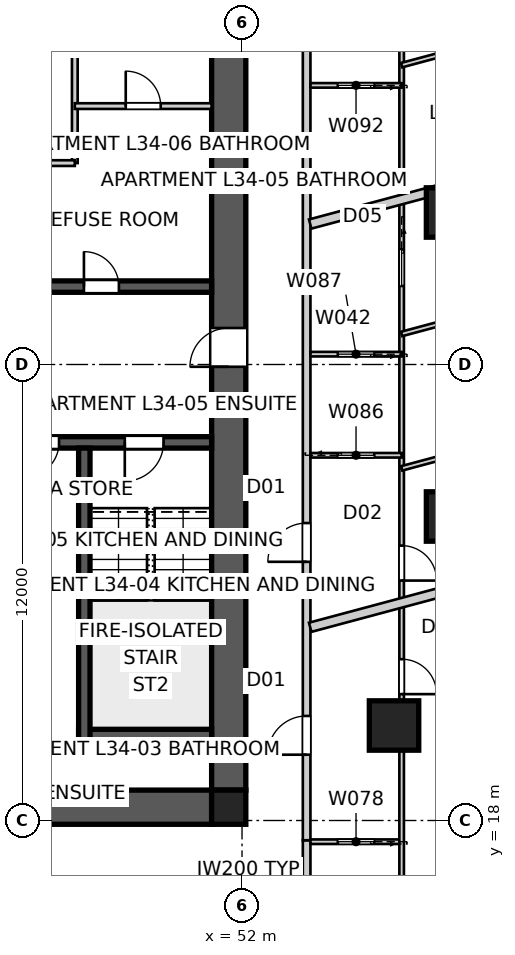
"""IFC4 building model, lengths in metres.
Left out: names, types, materials, properties, quantities, classifications, styles, units other than length and angle.
Written with IfcOpenShell. Run it as: python <this file> out.ifc"""

import sys

from ifc_helpers import new_model, si_unit, direction, frame, frame_2d, origin, origin_2d, place, context, subcontext, project, spatial, polyline, rectangle, outline, extrude, element, fill, save


model = new_model("IFC4")
c1 = context("Model", 3, precision=1e-05, world=origin(), true_north=direction((0.0, 1.0)))
c2 = subcontext(c1, "Body", "Model", "MODEL_VIEW")
j1 = project(units=[si_unit("LENGTHUNIT", "METRE"), si_unit("PLANEANGLEUNIT", "RADIAN")], contexts=[c1])
p1 = place(None, origin())
s1 = spatial("IfcSite", under=j1, at=p1, CompositionType="ELEMENT")
p2 = place(p1, origin())
s2 = spatial("IfcBuilding", under=s1, at=p2, CompositionType="ELEMENT")
p3 = place(p2, frame((0.0, 0.0, 125.2)))
s3 = spatial("IfcBuildingStorey", under=s2, at=p3, CompositionType="ELEMENT", Elevation=125.2)
p4 = place(p3, frame((51.2, 18.35, 0.0), z_axis=(0.0, 0.0, 1.0), x_axis=(-1.0, 0.0, 0.0)))
e1 = element("IfcWall", 1, at=p4, inside=s3, PredefinedType="SHEAR", context=c2, shape_type="SweptSolid", body=[
    extrude(outline(polyline([(0.0, -0.45), (22.4, -0.45), (22.4, -0.025), (22.85, -0.025), (22.85, 0.025), (22.4, 0.025), (22.4, 0.45), (0.0, 0.45), (0.0, 0.025), (-0.45, 0.025), (-0.45, -0.025), (0.0, -0.025), (0.0, -0.45)])), origin(), (0.0, 0.0, 1.0), 3.4),
])
p5 = place(p3, frame((51.65, 18.8, 0.0), z_axis=(0.0, 0.0, 1.0), x_axis=(0.0, 1.0, 0.0)))
e2 = element("IfcWall", 2, at=p5, inside=s3, PredefinedType="SHEAR", context=c2, shape_type="SweptSolid", body=[
    extrude(outline(polyline([(0.0, -0.45), (22.4, -0.45), (22.4, -0.025), (22.85, -0.025), (22.85, 0.025), (22.4, 0.025), (22.4, 0.45), (0.0, 0.45), (0.0, 0.025), (-0.45, 0.025), (-0.45, -0.025), (0.0, -0.025), (0.0, -0.45)])), origin(), (0.0, 0.0, 1.0), 3.4),
])
p6 = place(p5, frame((11.14, 0.0, 0.0)))
e3 = element("IfcOpeningElement", 3, at=p6, cuts=e2, PredefinedType="OPENING", context=c2, shape_type="SweptSolid", body=[
    extrude(rectangle(XDim=1.02, YDim=2.4, at=frame_2d((0.51, 1.2))), frame((0.0, 0.46, 0.0), z_axis=(0.0, -1.0, 0.0), x_axis=(1.0, 0.0, 0.0)), (0.0, 0.0, 1.0), 0.92),
])
p7 = place(p3, frame((28.8, 32.05, 0.0), z_axis=(0.0, 0.0, 1.0), x_axis=(1.0, 0.0, 0.0)))
e4 = element("IfcWall", 4, at=p7, inside=s3, PredefinedType="SHEAR", context=c2, shape_type="SweptSolid", body=[
    extrude(rectangle(XDim=22.4, YDim=0.3, at=frame_2d((11.2, 0.0))), origin(), (0.0, 0.0, 1.0), 3.4),
])
p8 = place(p7, frame((19.04, 0.0, 0.0)))
e5 = element("IfcOpeningElement", 5, at=p8, cuts=e4, PredefinedType="OPENING", context=c2, shape_type="SweptSolid", body=[
    extrude(rectangle(XDim=0.92, YDim=2.1, at=frame_2d((0.46, 1.05))), frame((0.0, 0.16, 0.0), z_axis=(0.0, -1.0, 0.0), x_axis=(1.0, 0.0, 0.0)), (0.0, 0.0, 1.0), 0.32),
])
p9 = place(p7, frame((1.265, 0.0, 0.0)))
e6 = element("IfcOpeningElement", 6, at=p9, cuts=e4, PredefinedType="OPENING", context=c2, shape_type="SweptSolid", body=[
    extrude(rectangle(XDim=1.02, YDim=2.1, at=frame_2d((0.51, 1.05))), frame((0.0, 0.16, 0.0), z_axis=(0.0, -1.0, 0.0), x_axis=(1.0, 0.0, 0.0)), (0.0, 0.0, 1.0), 0.32),
])
p10 = place(p7, frame((4.015, 0.0, 0.0)))
e7 = element("IfcOpeningElement", 7, at=p10, cuts=e4, PredefinedType="OPENING", context=c2, shape_type="SweptSolid", body=[
    extrude(rectangle(XDim=0.92, YDim=2.1, at=frame_2d((0.46, 1.05))), frame((0.0, 0.16, 0.0), z_axis=(0.0, -1.0, 0.0), x_axis=(1.0, 0.0, 0.0)), (0.0, 0.0, 1.0), 0.32),
])
p11 = place(p7, frame((6.45, 0.0, 0.0)))
e8 = element("IfcOpeningElement", 8, at=p11, cuts=e4, PredefinedType="OPENING", context=c2, shape_type="SweptSolid", body=[
    extrude(rectangle(XDim=1.1, YDim=2.1, at=frame_2d((0.55, 1.05))), frame((0.0, 0.16, 0.0), z_axis=(0.0, -1.0, 0.0), x_axis=(1.0, 0.0, 0.0)), (0.0, 0.0, 1.0), 0.32),
])
p12 = place(p7, frame((9.25, 0.0, 0.0)))
e9 = element("IfcOpeningElement", 9, at=p12, cuts=e4, PredefinedType="OPENING", context=c2, shape_type="SweptSolid", body=[
    extrude(rectangle(XDim=1.1, YDim=2.1, at=frame_2d((0.55, 1.05))), frame((0.0, 0.16, 0.0), z_axis=(0.0, -1.0, 0.0), x_axis=(1.0, 0.0, 0.0)), (0.0, 0.0, 1.0), 0.32),
])
p13 = place(p7, frame((14.85, 0.0, 0.0)))
e10 = element("IfcOpeningElement", 10, at=p13, cuts=e4, PredefinedType="OPENING", context=c2, shape_type="SweptSolid", body=[
    extrude(rectangle(XDim=1.1, YDim=2.1, at=frame_2d((0.55, 1.05))), frame((0.0, 0.16, 0.0), z_axis=(0.0, -1.0, 0.0), x_axis=(1.0, 0.0, 0.0)), (0.0, 0.0, 1.0), 0.32),
])
p14 = place(p3, frame((51.2, 27.95, 0.0), z_axis=(0.0, 0.0, 1.0), x_axis=(-1.0, 0.0, 0.0)))
e11 = element("IfcWall", 11, at=p14, inside=s3, PredefinedType="SHEAR", context=c2, shape_type="SweptSolid", body=[
    extrude(rectangle(XDim=22.4, YDim=0.3, at=frame_2d((11.2, 0.0))), origin(), (0.0, 0.0, 1.0), 3.4),
])
p15 = place(p14, frame((19.04, 0.0, 0.0)))
e12 = element("IfcOpeningElement", 12, at=p15, cuts=e11, PredefinedType="OPENING", context=c2, shape_type="SweptSolid", body=[
    extrude(rectangle(XDim=0.92, YDim=2.1, at=frame_2d((0.46, 1.05))), frame((0.0, 0.16, 0.0), z_axis=(0.0, -1.0, 0.0), x_axis=(1.0, 0.0, 0.0)), (0.0, 0.0, 1.0), 0.32),
])
p16 = place(p14, frame((1.265, 0.0, 0.0)))
e13 = element("IfcOpeningElement", 13, at=p16, cuts=e11, PredefinedType="OPENING", context=c2, shape_type="SweptSolid", body=[
    extrude(rectangle(XDim=1.02, YDim=2.1, at=frame_2d((0.51, 1.05))), frame((0.0, 0.16, 0.0), z_axis=(0.0, -1.0, 0.0), x_axis=(1.0, 0.0, 0.0)), (0.0, 0.0, 1.0), 0.32),
])
p17 = place(p14, frame((4.015, 0.0, 0.0)))
e14 = element("IfcOpeningElement", 14, at=p17, cuts=e11, PredefinedType="OPENING", context=c2, shape_type="SweptSolid", body=[
    extrude(rectangle(XDim=0.92, YDim=2.1, at=frame_2d((0.46, 1.05))), frame((0.0, 0.16, 0.0), z_axis=(0.0, -1.0, 0.0), x_axis=(1.0, 0.0, 0.0)), (0.0, 0.0, 1.0), 0.32),
])
p18 = place(p14, frame((14.85, 0.0, 0.0)))
e15 = element("IfcOpeningElement", 15, at=p18, cuts=e11, PredefinedType="OPENING", context=c2, shape_type="SweptSolid", body=[
    extrude(rectangle(XDim=1.1, YDim=2.1, at=frame_2d((0.55, 1.05))), frame((0.0, 0.16, 0.0), z_axis=(0.0, -1.0, 0.0), x_axis=(1.0, 0.0, 0.0)), (0.0, 0.0, 1.0), 0.32),
])
p19 = place(p3, frame((47.85, 27.8, 0.0), z_axis=(0.0, 0.0, 1.0), x_axis=(0.0, -1.0, 0.0)))
e16 = element("IfcWall", 16, at=p19, inside=s3, PredefinedType="SHEAR", context=c2, shape_type="SweptSolid", body=[
    extrude(rectangle(XDim=7.7, YDim=0.3, at=frame_2d((3.85, 0.0))), origin(), (0.0, 0.0, 1.0), 3.4),
])
p20 = place(p3, frame((51.2, 20.25, 0.0), z_axis=(0.0, 0.0, 1.0), x_axis=(-1.0, 0.0, 0.0)))
e17 = element("IfcWall", 17, at=p20, inside=s3, PredefinedType="SHEAR", context=c2, shape_type="SweptSolid", body=[
    extrude(rectangle(XDim=3.5, YDim=0.3, at=frame_2d((1.75, 0.0))), origin(), (0.0, 0.0, 1.0), 3.4),
])
p21 = place(p3, frame((51.65, 18.35, 0.0), z_axis=(0.0, 0.0, 1.0), x_axis=(1.0, 0.0, 0.0)))
e18 = element("IfcColumn", 18, at=p21, inside=s3, PredefinedType="COLUMN", context=c2, shape_type="SweptSolid", body=[
    extrude(rectangle(XDim=0.9, YDim=0.9, at=origin_2d()), origin(), (0.0, 0.0, 1.0), 3.4),
])
for number, where, z_axis, x_axis in (
    (19, (57.5, 26.0, 0.0), (0.0, 0.0, 1.0), (1.0, 0.0, 0.0)),
    (20, (57.5, 34.0, 0.0), (0.0, 0.0, 1.0), (1.0, 0.0, 0.0)),
    (21, (56.0, 20.5, 0.0), (0.0, 0.0, 1.0), (1.0, 0.0, 0.0)),
):
    element("IfcColumn", number, at=place(p3, frame(where, z_axis=z_axis, x_axis=x_axis)), inside=s3, PredefinedType="COLUMN", context=c2, shape_type="SweptSolid", body=[
        extrude(rectangle(XDim=1.3, YDim=1.3, at=origin_2d()), origin(), (0.0, 0.0, 1.0), 3.4),
    ])
p22 = place(p3, frame((53.7, 15.926, 0.0), z_axis=(0.0, 0.0, 1.0), x_axis=(0.0, 1.0, 0.0)))
e22 = element("IfcWall", 22, at=p22, inside=s3, PredefinedType="PARTITIONING", context=c2, shape_type="SweptSolid", body=[
    extrude(rectangle(XDim=1.554, YDim=0.2, at=frame_2d((0.777, 0.0))), origin(), (0.0, 0.0, 1.0), 2.722),
])
p23 = place(p3, frame((53.7, 17.48, 0.0), z_axis=(0.0, 0.0, 1.0), x_axis=(0.0, 1.0, 0.0)))
e23 = element("IfcWall", 23, at=p23, inside=s3, PredefinedType="PARTITIONING", context=c2, shape_type="SweptSolid", body=[
    extrude(rectangle(XDim=26.22, YDim=0.2, at=frame_2d((13.11, 0.0))), origin(), (0.0, 0.0, 1.0), 3.25),
])
p24 = place(p23, frame((2.252, 0.0, 0.0)))
e24 = element("IfcOpeningElement", 24, at=p24, cuts=e23, PredefinedType="OPENING", context=c2, shape_type="SweptSolid", body=[
    extrude(rectangle(XDim=1.02, YDim=2.34, at=frame_2d((0.51, 1.17))), frame((0.0, 0.11, 0.0), z_axis=(0.0, -1.0, 0.0), x_axis=(1.0, 0.0, 0.0)), (0.0, 0.0, 1.0), 0.22),
])
p25 = place(p23, frame((7.328, 0.0, 0.0)))
e25 = element("IfcOpeningElement", 25, at=p25, cuts=e23, PredefinedType="OPENING", context=c2, shape_type="SweptSolid", body=[
    extrude(rectangle(XDim=1.02, YDim=2.34, at=frame_2d((0.51, 1.17))), frame((0.0, 0.11, 0.0), z_axis=(0.0, -1.0, 0.0), x_axis=(1.0, 0.0, 0.0)), (0.0, 0.0, 1.0), 0.22),
])
p26 = place(p3, frame((63.665, 36.341, 0.0), z_axis=(0.0, 0.0, 1.0), x_axis=(-0.965927365002, -0.258813302479, 0.0)))
e26 = element("IfcWall", 26, at=p26, inside=s3, PredefinedType="PARTITIONING", context=c2, shape_type="SweptSolid", body=[
    extrude(rectangle(XDim=10.22, YDim=0.25, at=frame_2d((5.11, 0.0))), origin(), (0.0, 0.0, 1.0), 3.25),
])
p27 = place(p3, frame((66.318, 26.44, 0.0), z_axis=(0.0, 0.0, 1.0), x_axis=(-0.965924854576, -0.258822671559, 0.0)))
e27 = element("IfcWall", 27, at=p27, inside=s3, PredefinedType="PARTITIONING", context=c2, shape_type="SweptSolid", body=[
    extrude(rectangle(XDim=12.966, YDim=0.25, at=frame_2d((6.483, 0.0))), origin(), (0.0, 0.0, 1.0), 3.25),
])
p28 = place(p3, frame((47.6, 41.2, 0.0), z_axis=(0.0, 0.0, 1.0), x_axis=(0.0, -1.0, 0.0)))
e28 = element("IfcWall", 28, at=p28, inside=s3, PredefinedType="SOLIDWALL", context=c2, shape_type="SweptSolid", body=[
    extrude(rectangle(XDim=5.9, YDim=0.15, at=frame_2d((2.95, 0.0))), origin(), (0.0, 0.0, 1.0), 3.25),
])
p29 = place(p3, frame((47.6, 35.3, 0.0), z_axis=(0.0, 0.0, 1.0), x_axis=(-1.0, 0.0, 0.0)))
e29 = element("IfcWall", 29, at=p29, inside=s3, PredefinedType="SOLIDWALL", context=c2, shape_type="SweptSolid", body=[
    extrude(rectangle(XDim=1.85, YDim=0.15, at=frame_2d((0.925, 0.0))), origin(), (0.0, 0.0, 1.0), 3.25),
])
p30 = place(p3, frame((47.6, 36.8, 0.0), z_axis=(0.0, 0.0, 1.0), x_axis=(1.0, 0.0, 0.0)))
e30 = element("IfcWall", 30, at=p30, inside=s3, PredefinedType="SOLIDWALL", context=c2, shape_type="SweptSolid", body=[
    extrude(rectangle(XDim=3.6, YDim=0.15, at=frame_2d((1.8, 0.0))), origin(), (0.0, 0.0, 1.0), 3.25),
])
p31 = place(p30, frame((1.34, 0.0, 0.0)))
e31 = element("IfcOpeningElement", 31, at=p31, cuts=e30, PredefinedType="OPENING", context=c2, shape_type="SweptSolid", body=[
    extrude(rectangle(XDim=0.92, YDim=2.1, at=frame_2d((0.46, 1.05))), frame((0.0, 0.085, 0.0), z_axis=(0.0, -1.0, 0.0), x_axis=(1.0, 0.0, 0.0)), (0.0, 0.0, 1.0), 0.17),
])
p32 = place(p3, frame((56.2, 17.442, 0.0), z_axis=(0.0, 0.0, 1.0), x_axis=(-1.0, 0.0, 0.0)))
e32 = element("IfcWall", 32, at=p32, inside=s3, PredefinedType="PARTITIONING", context=c2, shape_type="SweptSolid", body=[
    extrude(rectangle(XDim=2.4, YDim=0.12, at=frame_2d((1.2, 0.0))), origin(), (0.0, 0.0, 1.0), 3.25),
])
p33 = place(p32, frame((0.72, 0.0, 0.0)))
e33 = element("IfcOpeningElement", 33, at=p33, cuts=e32, PredefinedType="OPENING", context=c2, shape_type="SweptSolid", body=[
    extrude(rectangle(XDim=0.96, YDim=2.1, at=frame_2d((0.48, 1.05))), frame((0.0, 0.07, 0.0), z_axis=(0.0, -1.0, 0.0), x_axis=(1.0, 0.0, 0.0)), (0.0, 0.0, 1.0), 0.14),
])
p34 = place(p3, frame((56.2, 46.2, 0.0), z_axis=(0.0, 0.0, 1.0), x_axis=(0.0, -1.0, 0.0)))
e34 = element("IfcWall", 34, at=p34, inside=s3, PredefinedType="PARTITIONING", context=c2, shape_type="SweptSolid", body=[
    extrude(rectangle(XDim=33.2, YDim=0.12, at=frame_2d((16.6, 0.0))), origin(), (0.0, 0.0, 1.0), 2.55),
])
p35 = place(p34, frame((23.955, 0.0, 0.0)))
e35 = element("IfcOpeningElement", 35, at=p35, cuts=e34, PredefinedType="OPENING", context=c2, shape_type="SweptSolid", body=[
    extrude(rectangle(XDim=0.92, YDim=2.34, at=frame_2d((0.46, 1.17))), frame((0.0, 0.07, 0.0), z_axis=(0.0, -1.0, 0.0), x_axis=(1.0, 0.0, 0.0)), (0.0, 0.0, 1.0), 0.14),
])
p36 = place(p34, frame((20.966, 0.0, 0.0)))
e36 = element("IfcOpeningElement", 36, at=p36, cuts=e34, PredefinedType="OPENING", context=c2, shape_type="SweptSolid", body=[
    extrude(rectangle(XDim=0.92, YDim=2.34, at=frame_2d((0.46, 1.17))), frame((0.0, 0.07, 0.0), z_axis=(0.0, -1.0, 0.0), x_axis=(1.0, 0.0, 0.0)), (0.0, 0.0, 1.0), 0.14),
])
p37 = place(p34, frame((13.174, 0.0, 0.0)))
e37 = element("IfcOpeningElement", 37, at=p37, cuts=e34, PredefinedType="OPENING", context=c2, shape_type="SweptSolid", body=[
    extrude(rectangle(XDim=0.96, YDim=2.1, at=frame_2d((0.48, 1.05))), frame((0.0, 0.07, 0.0), z_axis=(0.0, -1.0, 0.0), x_axis=(1.0, 0.0, 0.0)), (0.0, 0.0, 1.0), 0.14),
])
p38 = place(p3, frame((53.8, 27.611, 0.0), z_axis=(0.0, 0.0, 1.0), x_axis=(1.0, 0.0, 0.0)))
e38 = element("IfcWall", 38, at=p38, inside=s3, PredefinedType="PARTITIONING", context=c2, shape_type="SweptSolid", body=[
    extrude(rectangle(XDim=2.4, YDim=0.12, at=frame_2d((1.2, 0.0))), origin(), (0.0, 0.0, 1.0), 3.25),
])
p39 = place(p38, frame((0.72, 0.0, 0.0)))
e39 = element("IfcOpeningElement", 39, at=p39, cuts=e38, PredefinedType="OPENING", context=c2, shape_type="SweptSolid", body=[
    extrude(rectangle(XDim=0.96, YDim=2.1, at=frame_2d((0.48, 1.05))), frame((0.0, 0.07, 0.0), z_axis=(0.0, -1.0, 0.0), x_axis=(1.0, 0.0, 0.0)), (0.0, 0.0, 1.0), 0.14),
])
p40 = place(p3, frame((56.2, 30.272, 0.0), z_axis=(0.0, 0.0, 1.0), x_axis=(-1.0, 0.0, 0.0)))
e40 = element("IfcWall", 40, at=p40, inside=s3, PredefinedType="PARTITIONING", context=c2, shape_type="SweptSolid", body=[
    extrude(rectangle(XDim=2.4, YDim=0.12, at=frame_2d((1.2, 0.0))), origin(), (0.0, 0.0, 1.0), 3.25),
])
p41 = place(p40, frame((0.72, 0.0, 0.0)))
e41 = element("IfcOpeningElement", 41, at=p41, cuts=e40, PredefinedType="OPENING", context=c2, shape_type="SweptSolid", body=[
    extrude(rectangle(XDim=0.96, YDim=2.1, at=frame_2d((0.48, 1.05))), frame((0.0, 0.07, 0.0), z_axis=(0.0, -1.0, 0.0), x_axis=(1.0, 0.0, 0.0)), (0.0, 0.0, 1.0), 0.14),
])
p42 = place(p3, frame((56.2, 27.266, 0.0), z_axis=(0.0, 0.0, 1.0), x_axis=(0.965926072385, 0.25881812666, 0.0)))
e42 = element("IfcWall", 42, at=p42, inside=s3, PredefinedType="PARTITIONING", context=c2, shape_type="SweptSolid", body=[
    extrude(rectangle(XDim=9.52, YDim=0.12, at=frame_2d((4.76, 0.0))), origin(), (0.0, 0.0, 1.0), 3.25),
])
p43 = place(p42, frame((4.32, 0.0, 0.0)))
e43 = element("IfcOpeningElement", 43, at=p43, cuts=e42, PredefinedType="OPENING", context=c2, shape_type="SweptSolid", body=[
    extrude(rectangle(XDim=0.92, YDim=2.34, at=frame_2d((0.46, 1.17))), frame((0.0, 0.07, 0.0), z_axis=(0.0, -1.0, 0.0), x_axis=(1.0, 0.0, 0.0)), (0.0, 0.0, 1.0), 0.14),
])
p44 = place(p3, frame((56.2, 30.803, 0.0), z_axis=(0.0, 0.0, 1.0), x_axis=(0.965920565748, 0.258838676912, 0.0)))
e44 = element("IfcWall", 44, at=p44, inside=s3, PredefinedType="PARTITIONING", context=c2, shape_type="SweptSolid", body=[
    extrude(rectangle(XDim=8.604, YDim=0.12, at=frame_2d((4.302, 0.0))), origin(), (0.0, 0.0, 1.0), 3.25),
])
p45 = place(p3, frame((56.2, 37.345, 0.0), z_axis=(0.0, 0.0, 1.0), x_axis=(-1.0, 0.0, 0.0)))
e45 = element("IfcWall", 45, at=p45, inside=s3, PredefinedType="PARTITIONING", context=c2, shape_type="SweptSolid", body=[
    extrude(rectangle(XDim=2.4, YDim=0.12, at=frame_2d((1.2, 0.0))), origin(), (0.0, 0.0, 1.0), 3.25),
])
p46 = place(p45, frame((0.72, 0.0, 0.0)))
e46 = element("IfcOpeningElement", 46, at=p46, cuts=e45, PredefinedType="OPENING", context=c2, shape_type="SweptSolid", body=[
    extrude(rectangle(XDim=0.96, YDim=2.1, at=frame_2d((0.48, 1.05))), frame((0.0, 0.07, 0.0), z_axis=(0.0, -1.0, 0.0), x_axis=(1.0, 0.0, 0.0)), (0.0, 0.0, 1.0), 0.14),
])
p47 = place(p3, frame((56.2, 37.878, 0.0), z_axis=(0.0, 0.0, 1.0), x_axis=(0.96591892777, 0.258844789354, 0.0)))
e47 = element("IfcWall", 47, at=p47, inside=s3, PredefinedType="PARTITIONING", context=c2, shape_type="SweptSolid", body=[
    extrude(rectangle(XDim=6.773, YDim=0.12, at=frame_2d((3.386, 0.0))), origin(), (0.0, 0.0, 1.0), 3.25),
])
p48 = place(p47, frame((2.947, 0.0, 0.0)))
e48 = element("IfcOpeningElement", 48, at=p48, cuts=e47, PredefinedType="OPENING", context=c2, shape_type="SweptSolid", body=[
    extrude(rectangle(XDim=0.92, YDim=2.34, at=frame_2d((0.46, 1.17))), frame((0.0, 0.07, 0.0), z_axis=(0.0, -1.0, 0.0), x_axis=(1.0, 0.0, 0.0)), (0.0, 0.0, 1.0), 0.14),
])
p49 = place(p8, origin())
e49 = element("IfcDoor", 49, at=p49, inside=s3, OperationType="SINGLE_SWING_LEFT", PredefinedType="DOOR", context=c2, shape_type="SweptSolid", body=[
    extrude(rectangle(XDim=0.92, YDim=2.1, at=frame_2d((0.46, 1.05))), frame((0.0, 0.025, 0.0), z_axis=(0.0, -1.0, 0.0), x_axis=(1.0, 0.0, 0.0)), (0.0, 0.0, 1.0), 0.05),
])
fill(e5, e49)
p50 = place(p16, origin())
e50 = element("IfcDoor", 50, at=p50, inside=s3, OperationType="SINGLE_SWING_RIGHT", PredefinedType="DOOR", context=c2, shape_type="SweptSolid", body=[
    extrude(rectangle(XDim=1.02, YDim=2.1, at=frame_2d((0.51, 1.05))), frame((0.0, 0.025, 0.0), z_axis=(0.0, -1.0, 0.0), x_axis=(1.0, 0.0, 0.0)), (0.0, 0.0, 1.0), 0.05),
])
fill(e13, e50)
p51 = place(p17, origin())
e51 = element("IfcDoor", 51, at=p51, inside=s3, OperationType="SINGLE_SWING_RIGHT", PredefinedType="DOOR", context=c2, shape_type="SweptSolid", body=[
    extrude(rectangle(XDim=0.92, YDim=2.1, at=frame_2d((0.46, 1.05))), frame((0.0, 0.025, 0.0), z_axis=(0.0, -1.0, 0.0), x_axis=(1.0, 0.0, 0.0)), (0.0, 0.0, 1.0), 0.05),
])
fill(e14, e51)
p52 = place(p24, origin())
e52 = element("IfcDoor", 52, at=p52, inside=s3, OperationType="SINGLE_SWING_LEFT", PredefinedType="DOOR", context=c2, shape_type="SweptSolid", body=[
    extrude(rectangle(XDim=1.02, YDim=2.34, at=frame_2d((0.51, 1.17))), frame((0.0, 0.025, 0.0), z_axis=(0.0, -1.0, 0.0), x_axis=(1.0, 0.0, 0.0)), (0.0, 0.0, 1.0), 0.05),
])
fill(e24, e52)
p53 = place(p25, origin())
e53 = element("IfcDoor", 53, at=p53, inside=s3, OperationType="SINGLE_SWING_LEFT", PredefinedType="DOOR", context=c2, shape_type="SweptSolid", body=[
    extrude(rectangle(XDim=1.02, YDim=2.34, at=frame_2d((0.51, 1.17))), frame((0.0, 0.025, 0.0), z_axis=(0.0, -1.0, 0.0), x_axis=(1.0, 0.0, 0.0)), (0.0, 0.0, 1.0), 0.05),
])
fill(e25, e53)
p54 = place(p31, origin())
e54 = element("IfcDoor", 54, at=p54, inside=s3, OperationType="SINGLE_SWING_LEFT", PredefinedType="DOOR", context=c2, shape_type="SweptSolid", body=[
    extrude(rectangle(XDim=0.92, YDim=2.1, at=frame_2d((0.46, 1.05))), frame((0.0, 0.025, 0.0), z_axis=(0.0, -1.0, 0.0), x_axis=(1.0, 0.0, 0.0)), (0.0, 0.0, 1.0), 0.05),
])
fill(e31, e54)
p55 = place(p35, origin())
e55 = element("IfcDoor", 55, at=p55, inside=s3, OperationType="SINGLE_SWING_RIGHT", PredefinedType="DOOR", context=c2, shape_type="SweptSolid", body=[
    extrude(rectangle(XDim=0.92, YDim=2.34, at=frame_2d((0.46, 1.17))), frame((0.0, 0.025, 0.0), z_axis=(0.0, -1.0, 0.0), x_axis=(1.0, 0.0, 0.0)), (0.0, 0.0, 1.0), 0.05),
])
fill(e35, e55)
p56 = place(p33, origin())
e56 = element("IfcDoor", 56, at=p56, inside=s3, OperationType="SLIDING_TO_LEFT", PredefinedType="DOOR", context=c2, shape_type="SweptSolid", body=[
    extrude(rectangle(XDim=0.96, YDim=2.1, at=frame_2d((0.48, 1.05))), frame((0.0, 0.025, 0.0), z_axis=(0.0, -1.0, 0.0), x_axis=(1.0, 0.0, 0.0)), (0.0, 0.0, 1.0), 0.05),
])
fill(e33, e56)
p57 = place(p36, origin())
e57 = element("IfcDoor", 57, at=p57, inside=s3, OperationType="SINGLE_SWING_RIGHT", PredefinedType="DOOR", context=c2, shape_type="SweptSolid", body=[
    extrude(rectangle(XDim=0.92, YDim=2.34, at=frame_2d((0.46, 1.17))), frame((0.0, 0.025, 0.0), z_axis=(0.0, -1.0, 0.0), x_axis=(1.0, 0.0, 0.0)), (0.0, 0.0, 1.0), 0.05),
])
fill(e36, e57)
p58 = place(p39, origin())
e58 = element("IfcDoor", 58, at=p58, inside=s3, OperationType="SLIDING_TO_LEFT", PredefinedType="DOOR", context=c2, shape_type="SweptSolid", body=[
    extrude(rectangle(XDim=0.96, YDim=2.1, at=frame_2d((0.48, 1.05))), frame((0.0, 0.025, 0.0), z_axis=(0.0, -1.0, 0.0), x_axis=(1.0, 0.0, 0.0)), (0.0, 0.0, 1.0), 0.05),
])
fill(e39, e58)
p59 = place(p46, origin())
e59 = element("IfcDoor", 59, at=p59, inside=s3, OperationType="SLIDING_TO_LEFT", PredefinedType="DOOR", context=c2, shape_type="SweptSolid", body=[
    extrude(rectangle(XDim=0.96, YDim=2.1, at=frame_2d((0.48, 1.05))), frame((0.0, 0.025, 0.0), z_axis=(0.0, -1.0, 0.0), x_axis=(1.0, 0.0, 0.0)), (0.0, 0.0, 1.0), 0.05),
])
fill(e46, e59)
p60 = place(p41, origin())
e60 = element("IfcDoor", 60, at=p60, inside=s3, OperationType="SLIDING_TO_LEFT", PredefinedType="DOOR", context=c2, shape_type="SweptSolid", body=[
    extrude(rectangle(XDim=0.96, YDim=2.1, at=frame_2d((0.48, 1.05))), frame((0.0, 0.025, 0.0), z_axis=(0.0, -1.0, 0.0), x_axis=(1.0, 0.0, 0.0)), (0.0, 0.0, 1.0), 0.05),
])
fill(e41, e60)
p61 = place(p37, origin())
e61 = element("IfcDoor", 61, at=p61, inside=s3, OperationType="SLIDING_TO_LEFT", PredefinedType="DOOR", context=c2, shape_type="SweptSolid", body=[
    extrude(rectangle(XDim=0.96, YDim=2.1, at=frame_2d((0.48, 1.05))), frame((0.0, 0.025, 0.0), z_axis=(0.0, -1.0, 0.0), x_axis=(1.0, 0.0, 0.0)), (0.0, 0.0, 1.0), 0.05),
])
fill(e37, e61)
p62 = place(p6, origin())
e62 = element("IfcDoor", 62, at=p62, inside=s3, OperationType="SINGLE_SWING_LEFT", PredefinedType="DOOR", context=c2, shape_type="SweptSolid", body=[
    extrude(rectangle(XDim=1.02, YDim=2.4, at=frame_2d((0.51, 1.2))), frame((0.0, 0.025, 0.0), z_axis=(0.0, -1.0, 0.0), x_axis=(1.0, 0.0, 0.0)), (0.0, 0.0, 1.0), 0.05),
])
fill(e3, e62)
save(model, sys.argv[1])
